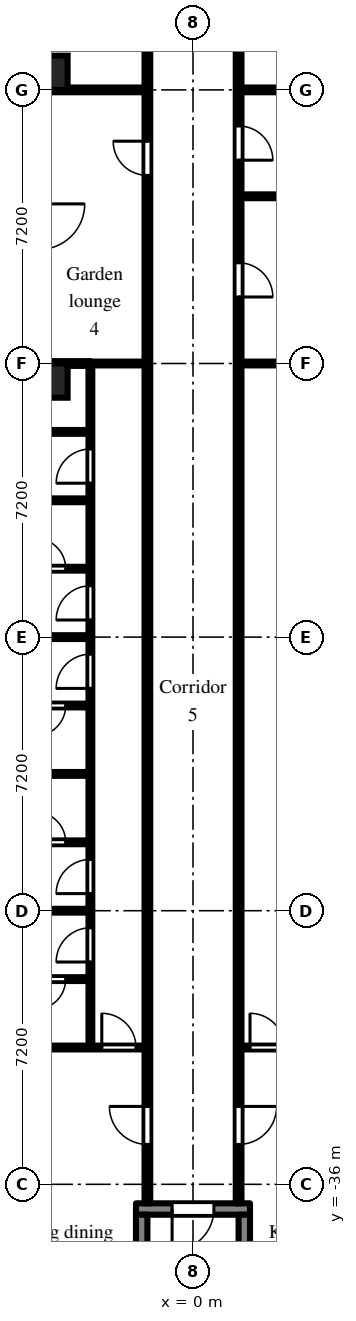
"""IFC4 building model, lengths in metres.
Left out: names, types, materials, properties, quantities, classifications, styles, units other than length and angle.
Written with IfcOpenShell. Run it as: python <this file> out.ifc"""

import sys

from ifc_helpers import new_model, si_unit, direction, frame, frame_2d, origin, origin_2d, place, context, subcontext, project, spatial, rectangle, extrude, element, fill, save


model = new_model("IFC4")
c1 = context("Model", 3, precision=1e-05, world=origin(), true_north=direction((0.0, 1.0)))
c2 = subcontext(c1, "Body", "Model", "MODEL_VIEW")
j1 = project(units=[si_unit("LENGTHUNIT", "METRE"), si_unit("PLANEANGLEUNIT", "RADIAN")], contexts=[c1])
p1 = place(None, origin())
s1 = spatial("IfcSite", under=j1, at=p1, CompositionType="ELEMENT")
p2 = place(p1, origin())
s2 = spatial("IfcBuilding", under=s1, at=p2, CompositionType="ELEMENT")
p3 = place(p2, frame((0.0, 0.0, 93.9)))
s3 = spatial("IfcBuildingStorey", under=s2, at=p3, CompositionType="ELEMENT", Elevation=93.9)
for number, where, z_axis, x_axis in (
    (1, (-3.75, -14.85, 0.0), (0.0, 0.0, 1.0), (1.0, 0.0, 0.0)),
    (2, (-3.75, -6.75, 0.0), (0.0, 0.0, 1.0), (1.0, 0.0, 0.0)),
):
    element("IfcColumn", number, at=place(p3, frame(where, z_axis=z_axis, x_axis=x_axis)), inside=s3, PredefinedType="COLUMN", context=c2, shape_type="SweptSolid", body=[
        extrude(rectangle(XDim=0.9, YDim=0.9, at=origin_2d()), origin(), (0.0, 0.0, 1.0), 3.0),
    ])
p4 = place(p3, frame((-1.5, -36.65, 0.0), z_axis=(0.0, 0.0, 1.0), x_axis=(1.0, 0.0, 0.0)))
e3 = element("IfcWall", 3, at=p4, inside=s3, PredefinedType="SHEAR", context=c2, shape_type="SweptSolid", body=[
    extrude(rectangle(XDim=3.0, YDim=0.3, at=frame_2d((1.5, 0.0))), origin(), (0.0, 0.0, 1.0), 2.575),
])
p5 = place(p4, frame((0.95, 0.0, 0.0)))
e4 = element("IfcOpeningElement", 4, at=p5, cuts=e3, PredefinedType="OPENING", context=c2, shape_type="SweptSolid", body=[
    extrude(rectangle(XDim=1.1, YDim=2.1, at=frame_2d((0.55, 1.05))), frame((0.0, 0.16, 0.0), z_axis=(0.0, -1.0, 0.0), x_axis=(1.0, 0.0, 0.0)), (0.0, 0.0, 1.0), 0.32),
])
for number, where, z_axis, x_axis in (
    (5, (-1.35, -36.8, 0.0), (0.0, 0.0, 1.0), (0.0, -1.0, 0.0)),
    (6, (1.35, -36.8, 0.0), (0.0, 0.0, 1.0), (0.0, -1.0, 0.0)),
):
    element("IfcWall", number, at=place(p3, frame(where, z_axis=z_axis, x_axis=x_axis)), inside=s3, PredefinedType="SHEAR", context=c2, shape_type="SweptSolid", body=[
        extrude(rectangle(XDim=5.8, YDim=0.3, at=frame_2d((2.9, 0.0))), origin(), (0.0, 0.0, 1.0), 2.575),
    ])
p6 = place(p3, frame((-6.9, -32.4, 0.0), z_axis=(0.0, 0.0, 1.0), x_axis=(1.0, 0.0, 0.0)))
e7 = element("IfcWall", 7, at=p6, inside=s3, PredefinedType="PARTITIONING", context=c2, shape_type="SweptSolid", body=[
    extrude(rectangle(XDim=5.625, YDim=0.1, at=frame_2d((2.812, 0.0))), origin(), (0.0, 0.0, 1.0), 2.575),
])
p7 = place(p6, frame((4.5, 0.0, 0.0)))
e8 = element("IfcOpeningElement", 8, at=p7, cuts=e7, PredefinedType="OPENING", context=c2, shape_type="SweptSolid", body=[
    extrude(rectangle(XDim=0.9, YDim=2.1, at=frame_2d((0.45, 1.05))), frame((0.0, 0.06, 0.0), z_axis=(0.0, -1.0, 0.0), x_axis=(1.0, 0.0, 0.0)), (0.0, 0.0, 1.0), 0.12),
])
for number, where, z_axis, x_axis in (
    (9, (-6.9, -28.8, 0.0), (0.0, 0.0, 1.0), (1.0, 0.0, 0.0)),
    (10, (-6.9, -25.2, 0.0), (0.0, 0.0, 1.0), (1.0, 0.0, 0.0)),
    (11, (-6.9, -21.6, 0.0), (0.0, 0.0, 1.0), (1.0, 0.0, 0.0)),
    (12, (-6.9, -18.0, 0.0), (0.0, 0.0, 1.0), (1.0, 0.0, 0.0)),
):
    element("IfcWall", number, at=place(p3, frame(where, z_axis=z_axis, x_axis=x_axis)), inside=s3, PredefinedType="PARTITIONING", context=c2, shape_type="SweptSolid", body=[
        extrude(rectangle(XDim=4.15, YDim=0.1, at=frame_2d((2.075, 0.0))), origin(), (0.0, 0.0, 1.0), 2.575),
    ])
p8 = place(p3, frame((-4.75, -30.6, 0.0), z_axis=(0.0, 0.0, 1.0), x_axis=(1.0, 0.0, 0.0)))
e13 = element("IfcWall", 13, at=p8, inside=s3, PredefinedType="PARTITIONING", context=c2, shape_type="SweptSolid", body=[
    extrude(rectangle(XDim=2.0, YDim=0.1, at=frame_2d((1.0, 0.0))), origin(), (0.0, 0.0, 1.0), 2.575),
])
p9 = place(p8, frame((0.6, 0.0, 0.0)))
e14 = element("IfcOpeningElement", 14, at=p9, cuts=e13, PredefinedType="OPENING", context=c2, shape_type="SweptSolid", body=[
    extrude(rectangle(XDim=0.8, YDim=2.1, at=frame_2d((0.4, 1.05))), frame((0.0, 0.06, 0.0), z_axis=(0.0, -1.0, 0.0), x_axis=(1.0, 0.0, 0.0)), (0.0, 0.0, 1.0), 0.12),
])
p10 = place(p3, frame((-4.75, -27.0, 0.0), z_axis=(0.0, 0.0, 1.0), x_axis=(1.0, 0.0, 0.0)))
e15 = element("IfcWall", 15, at=p10, inside=s3, PredefinedType="PARTITIONING", context=c2, shape_type="SweptSolid", body=[
    extrude(rectangle(XDim=2.0, YDim=0.1, at=frame_2d((1.0, 0.0))), origin(), (0.0, 0.0, 1.0), 2.575),
])
p11 = place(p10, frame((0.6, 0.0, 0.0)))
e16 = element("IfcOpeningElement", 16, at=p11, cuts=e15, PredefinedType="OPENING", context=c2, shape_type="SweptSolid", body=[
    extrude(rectangle(XDim=0.8, YDim=2.1, at=frame_2d((0.4, 1.05))), frame((0.0, 0.06, 0.0), z_axis=(0.0, -1.0, 0.0), x_axis=(1.0, 0.0, 0.0)), (0.0, 0.0, 1.0), 0.12),
])
p12 = place(p3, frame((-4.75, -23.4, 0.0), z_axis=(0.0, 0.0, 1.0), x_axis=(1.0, 0.0, 0.0)))
e17 = element("IfcWall", 17, at=p12, inside=s3, PredefinedType="PARTITIONING", context=c2, shape_type="SweptSolid", body=[
    extrude(rectangle(XDim=2.0, YDim=0.1, at=frame_2d((1.0, 0.0))), origin(), (0.0, 0.0, 1.0), 2.575),
])
p13 = place(p12, frame((0.6, 0.0, 0.0)))
e18 = element("IfcOpeningElement", 18, at=p13, cuts=e17, PredefinedType="OPENING", context=c2, shape_type="SweptSolid", body=[
    extrude(rectangle(XDim=0.8, YDim=2.1, at=frame_2d((0.4, 1.05))), frame((0.0, 0.06, 0.0), z_axis=(0.0, -1.0, 0.0), x_axis=(1.0, 0.0, 0.0)), (0.0, 0.0, 1.0), 0.12),
])
p14 = place(p3, frame((-4.75, -19.8, 0.0), z_axis=(0.0, 0.0, 1.0), x_axis=(1.0, 0.0, 0.0)))
e19 = element("IfcWall", 19, at=p14, inside=s3, PredefinedType="PARTITIONING", context=c2, shape_type="SweptSolid", body=[
    extrude(rectangle(XDim=2.0, YDim=0.1, at=frame_2d((1.0, 0.0))), origin(), (0.0, 0.0, 1.0), 2.575),
])
p15 = place(p14, frame((0.6, 0.0, 0.0)))
e20 = element("IfcOpeningElement", 20, at=p15, cuts=e19, PredefinedType="OPENING", context=c2, shape_type="SweptSolid", body=[
    extrude(rectangle(XDim=0.8, YDim=2.1, at=frame_2d((0.4, 1.05))), frame((0.0, 0.06, 0.0), z_axis=(0.0, -1.0, 0.0), x_axis=(1.0, 0.0, 0.0)), (0.0, 0.0, 1.0), 0.12),
])
p16 = place(p3, frame((-4.75, -16.2, 0.0), z_axis=(0.0, 0.0, 1.0), x_axis=(1.0, 0.0, 0.0)))
e21 = element("IfcWall", 21, at=p16, inside=s3, PredefinedType="PARTITIONING", context=c2, shape_type="SweptSolid", body=[
    extrude(rectangle(XDim=2.0, YDim=0.1, at=frame_2d((1.0, 0.0))), origin(), (0.0, 0.0, 1.0), 2.575),
])
p17 = place(p3, frame((-3.9, -14.4, 0.0), z_axis=(0.0, 0.0, 1.0), x_axis=(1.0, 0.0, 0.0)))
e22 = element("IfcWall", 22, at=p17, inside=s3, PredefinedType="PARTITIONING", context=c2, shape_type="SweptSolid", body=[
    extrude(rectangle(XDim=1.2, YDim=0.125, at=frame_2d((0.6, 0.0))), origin(), (0.0, 0.0, 1.0), 2.575),
])
p18 = place(p3, frame((-3.9, -7.2, 0.0), z_axis=(0.0, 0.0, 1.0), x_axis=(1.0, 0.0, 0.0)))
e23 = element("IfcWall", 23, at=p18, inside=s3, PredefinedType="PARTITIONING", context=c2, shape_type="SweptSolid", body=[
    extrude(rectangle(XDim=2.625, YDim=0.125, at=frame_2d((1.312, 0.0))), origin(), (0.0, 0.0, 1.0), 2.575),
])
p19 = place(p3, frame((-2.7, -32.35, 0.0), z_axis=(0.0, 0.0, 1.0), x_axis=(0.0, 1.0, 0.0)))
e24 = element("IfcWall", 24, at=p19, inside=s3, PredefinedType="PARTITIONING", context=c2, shape_type="SweptSolid", body=[
    extrude(rectangle(XDim=17.888, YDim=0.1, at=frame_2d((8.944, 0.0))), origin(), (0.0, 0.0, 1.0), 2.575),
])
p20 = place(p19, frame((2.2, 0.0, 0.0)))
e25 = element("IfcOpeningElement", 25, at=p20, cuts=e24, PredefinedType="OPENING", context=c2, shape_type="SweptSolid", body=[
    extrude(rectangle(XDim=0.9, YDim=2.1, at=frame_2d((0.45, 1.05))), frame((0.0, 0.06, 0.0), z_axis=(0.0, -1.0, 0.0), x_axis=(1.0, 0.0, 0.0)), (0.0, 0.0, 1.0), 0.12),
])
p21 = place(p19, frame((4.0, 0.0, 0.0)))
e26 = element("IfcOpeningElement", 26, at=p21, cuts=e24, PredefinedType="OPENING", context=c2, shape_type="SweptSolid", body=[
    extrude(rectangle(XDim=0.9, YDim=2.1, at=frame_2d((0.45, 1.05))), frame((0.0, 0.06, 0.0), z_axis=(0.0, -1.0, 0.0), x_axis=(1.0, 0.0, 0.0)), (0.0, 0.0, 1.0), 0.12),
])
p22 = place(p19, frame((9.4, 0.0, 0.0)))
e27 = element("IfcOpeningElement", 27, at=p22, cuts=e24, PredefinedType="OPENING", context=c2, shape_type="SweptSolid", body=[
    extrude(rectangle(XDim=0.9, YDim=2.1, at=frame_2d((0.45, 1.05))), frame((0.0, 0.06, 0.0), z_axis=(0.0, -1.0, 0.0), x_axis=(1.0, 0.0, 0.0)), (0.0, 0.0, 1.0), 0.12),
])
p23 = place(p19, frame((11.2, 0.0, 0.0)))
e28 = element("IfcOpeningElement", 28, at=p23, cuts=e24, PredefinedType="OPENING", context=c2, shape_type="SweptSolid", body=[
    extrude(rectangle(XDim=0.9, YDim=2.1, at=frame_2d((0.45, 1.05))), frame((0.0, 0.06, 0.0), z_axis=(0.0, -1.0, 0.0), x_axis=(1.0, 0.0, 0.0)), (0.0, 0.0, 1.0), 0.12),
])
p24 = place(p19, frame((14.8, 0.0, 0.0)))
e29 = element("IfcOpeningElement", 29, at=p24, cuts=e24, PredefinedType="OPENING", context=c2, shape_type="SweptSolid", body=[
    extrude(rectangle(XDim=0.9, YDim=2.1, at=frame_2d((0.45, 1.05))), frame((0.0, 0.06, 0.0), z_axis=(0.0, -1.0, 0.0), x_axis=(1.0, 0.0, 0.0)), (0.0, 0.0, 1.0), 0.12),
])
p25 = place(p3, frame((-2.7, -14.4, 0.0), z_axis=(0.0, 0.0, 1.0), x_axis=(1.0, 0.0, 0.0)))
e30 = element("IfcWall", 30, at=p25, inside=s3, PredefinedType="PARTITIONING", context=c2, shape_type="SweptSolid", body=[
    extrude(rectangle(XDim=1.425, YDim=0.1, at=frame_2d((0.712, 0.0))), origin(), (0.0, 0.0, 1.0), 2.575),
])
p26 = place(p3, frame((-1.2, -36.5, 0.0), z_axis=(0.0, 0.0, 1.0), x_axis=(0.0, 1.0, 0.0)))
e31 = element("IfcWall", 31, at=p26, inside=s3, PredefinedType="PARTITIONING", context=c2, shape_type="SweptSolid", body=[
    extrude(rectangle(XDim=35.225, YDim=0.15, at=frame_2d((17.613, 0.0))), origin(), (0.0, 0.0, 1.0), 2.575),
])
p27 = place(p26, frame((31.85, 0.0, 0.0)))
e32 = element("IfcOpeningElement", 32, at=p27, cuts=e31, PredefinedType="OPENING", context=c2, shape_type="SweptSolid", body=[
    extrude(rectangle(XDim=0.9, YDim=2.1, at=frame_2d((0.45, 1.05))), frame((0.0, 0.085, 0.0), z_axis=(0.0, -1.0, 0.0), x_axis=(1.0, 0.0, 0.0)), (0.0, 0.0, 1.0), 0.17),
])
p28 = place(p26, frame((27.05, 0.0, 0.0)))
e33 = element("IfcOpeningElement", 33, at=p28, cuts=e31, PredefinedType="OPENING", context=c2, shape_type="SweptSolid", body=[
    extrude(rectangle(XDim=0.9, YDim=2.1, at=frame_2d((0.45, 1.05))), frame((0.0, 0.085, 0.0), z_axis=(0.0, -1.0, 0.0), x_axis=(1.0, 0.0, 0.0)), (0.0, 0.0, 1.0), 0.17),
])
p29 = place(p26, frame((1.55, 0.0, 0.0)))
e34 = element("IfcOpeningElement", 34, at=p29, cuts=e31, PredefinedType="OPENING", context=c2, shape_type="SweptSolid", body=[
    extrude(rectangle(XDim=1.0, YDim=2.1, at=frame_2d((0.5, 1.05))), frame((0.0, 0.085, 0.0), z_axis=(0.0, -1.0, 0.0), x_axis=(1.0, 0.0, 0.0)), (0.0, 0.0, 1.0), 0.17),
])
p30 = place(p3, frame((1.2, -36.5, 0.0), z_axis=(0.0, 0.0, 1.0), x_axis=(0.0, 1.0, 0.0)))
e35 = element("IfcWall", 35, at=p30, inside=s3, PredefinedType="PARTITIONING", context=c2, shape_type="SweptSolid", body=[
    extrude(rectangle(XDim=35.375, YDim=0.15, at=frame_2d((17.688, 0.0))), origin(), (0.0, 0.0, 1.0), 2.575),
])
p31 = place(p30, frame((33.65, 0.0, 0.0)))
e36 = element("IfcOpeningElement", 36, at=p31, cuts=e35, PredefinedType="OPENING", context=c2, shape_type="SweptSolid", body=[
    extrude(rectangle(XDim=0.9, YDim=2.1, at=frame_2d((0.45, 1.05))), frame((0.0, 0.085, 0.0), z_axis=(0.0, -1.0, 0.0), x_axis=(1.0, 0.0, 0.0)), (0.0, 0.0, 1.0), 0.17),
])
p32 = place(p30, frame((30.65, 0.0, 0.0)))
e37 = element("IfcOpeningElement", 37, at=p32, cuts=e35, PredefinedType="OPENING", context=c2, shape_type="SweptSolid", body=[
    extrude(rectangle(XDim=0.9, YDim=2.1, at=frame_2d((0.45, 1.05))), frame((0.0, 0.085, 0.0), z_axis=(0.0, -1.0, 0.0), x_axis=(1.0, 0.0, 0.0)), (0.0, 0.0, 1.0), 0.17),
])
p33 = place(p30, frame((27.45, 0.0, 0.0)))
e38 = element("IfcOpeningElement", 38, at=p33, cuts=e35, PredefinedType="OPENING", context=c2, shape_type="SweptSolid", body=[
    extrude(rectangle(XDim=0.9, YDim=2.1, at=frame_2d((0.45, 1.05))), frame((0.0, 0.085, 0.0), z_axis=(0.0, -1.0, 0.0), x_axis=(1.0, 0.0, 0.0)), (0.0, 0.0, 1.0), 0.17),
])
p34 = place(p30, frame((23.85, 0.0, 0.0)))
e39 = element("IfcOpeningElement", 39, at=p34, cuts=e35, PredefinedType="OPENING", context=c2, shape_type="SweptSolid", body=[
    extrude(rectangle(XDim=0.9, YDim=2.1, at=frame_2d((0.45, 1.05))), frame((0.0, 0.085, 0.0), z_axis=(0.0, -1.0, 0.0), x_axis=(1.0, 0.0, 0.0)), (0.0, 0.0, 1.0), 0.17),
])
p35 = place(p30, frame((1.55, 0.0, 0.0)))
e40 = element("IfcOpeningElement", 40, at=p35, cuts=e35, PredefinedType="OPENING", context=c2, shape_type="SweptSolid", body=[
    extrude(rectangle(XDim=1.0, YDim=2.1, at=frame_2d((0.5, 1.05))), frame((0.0, 0.085, 0.0), z_axis=(0.0, -1.0, 0.0), x_axis=(1.0, 0.0, 0.0)), (0.0, 0.0, 1.0), 0.17),
])
p36 = place(p3, frame((1.275, -32.4, 0.0), z_axis=(0.0, 0.0, 1.0), x_axis=(1.0, 0.0, 0.0)))
e41 = element("IfcWall", 41, at=p36, inside=s3, PredefinedType="PARTITIONING", context=c2, shape_type="SweptSolid", body=[
    extrude(rectangle(XDim=5.625, YDim=0.1, at=frame_2d((2.812, 0.0))), origin(), (0.0, 0.0, 1.0), 2.575),
])
p37 = place(p36, frame((0.225, 0.0, 0.0)))
e42 = element("IfcOpeningElement", 42, at=p37, cuts=e41, PredefinedType="OPENING", context=c2, shape_type="SweptSolid", body=[
    extrude(rectangle(XDim=0.9, YDim=2.1, at=frame_2d((0.45, 1.05))), frame((0.0, 0.06, 0.0), z_axis=(0.0, -1.0, 0.0), x_axis=(1.0, 0.0, 0.0)), (0.0, 0.0, 1.0), 0.12),
])
p38 = place(p3, frame((1.275, -14.4, 0.0), z_axis=(0.0, 0.0, 1.0), x_axis=(1.0, 0.0, 0.0)))
e43 = element("IfcWall", 43, at=p38, inside=s3, PredefinedType="PARTITIONING", context=c2, shape_type="SweptSolid", body=[
    extrude(rectangle(XDim=1.425, YDim=0.1, at=frame_2d((0.712, 0.0))), origin(), (0.0, 0.0, 1.0), 2.575),
])
p39 = place(p3, frame((1.275, -10.0, 0.0), z_axis=(0.0, 0.0, 1.0), x_axis=(1.0, 0.0, 0.0)))
e44 = element("IfcWall", 44, at=p39, inside=s3, PredefinedType="PARTITIONING", context=c2, shape_type="SweptSolid", body=[
    extrude(rectangle(XDim=2.625, YDim=0.1, at=frame_2d((1.312, 0.0))), origin(), (0.0, 0.0, 1.0), 2.575),
])
p40 = place(p3, frame((1.275, -7.2, 0.0), z_axis=(0.0, 0.0, 1.0), x_axis=(1.0, 0.0, 0.0)))
e45 = element("IfcWall", 45, at=p40, inside=s3, PredefinedType="PARTITIONING", context=c2, shape_type="SweptSolid", body=[
    extrude(rectangle(XDim=2.625, YDim=0.125, at=frame_2d((1.312, 0.0))), origin(), (0.0, 0.0, 1.0), 2.575),
])
p41 = place(p5, frame((1.1, 0.0, 0.0), z_axis=(0.0, 0.0, 1.0), x_axis=(-1.0, 0.0, 0.0)))
e46 = element("IfcDoor", 46, at=p41, inside=s3, OperationType="SINGLE_SWING_RIGHT", PredefinedType="DOOR", context=c2, shape_type="SweptSolid", body=[
    extrude(rectangle(XDim=1.1, YDim=2.1, at=frame_2d((0.55, 1.05))), frame((0.0, 0.025, 0.0), z_axis=(0.0, -1.0, 0.0), x_axis=(1.0, 0.0, 0.0)), (0.0, 0.0, 1.0), 0.05),
])
fill(e4, e46)
p42 = place(p33, frame((0.9, 0.0, 0.0), z_axis=(0.0, 0.0, 1.0), x_axis=(-1.0, 0.0, 0.0)))
e47 = element("IfcDoor", 47, at=p42, inside=s3, OperationType="SINGLE_SWING_RIGHT", PredefinedType="DOOR", context=c2, shape_type="SweptSolid", body=[
    extrude(rectangle(XDim=0.9, YDim=2.1, at=frame_2d((0.45, 1.05))), frame((0.0, 0.025, 0.0), z_axis=(0.0, -1.0, 0.0), x_axis=(1.0, 0.0, 0.0)), (0.0, 0.0, 1.0), 0.05),
])
fill(e38, e47)
p43 = place(p34, frame((0.9, 0.0, 0.0), z_axis=(0.0, 0.0, 1.0), x_axis=(-1.0, 0.0, 0.0)))
e48 = element("IfcDoor", 48, at=p43, inside=s3, OperationType="SINGLE_SWING_RIGHT", PredefinedType="DOOR", context=c2, shape_type="SweptSolid", body=[
    extrude(rectangle(XDim=0.9, YDim=2.1, at=frame_2d((0.45, 1.05))), frame((0.0, 0.025, 0.0), z_axis=(0.0, -1.0, 0.0), x_axis=(1.0, 0.0, 0.0)), (0.0, 0.0, 1.0), 0.05),
])
fill(e39, e48)
p44 = place(p35, frame((1.0, 0.0, 0.0), z_axis=(0.0, 0.0, 1.0), x_axis=(-1.0, 0.0, 0.0)))
e49 = element("IfcDoor", 49, at=p44, inside=s3, OperationType="SINGLE_SWING_LEFT", PredefinedType="DOOR", context=c2, shape_type="SweptSolid", body=[
    extrude(rectangle(XDim=1.0, YDim=2.1, at=frame_2d((0.5, 1.05))), frame((0.0, 0.025, 0.0), z_axis=(0.0, -1.0, 0.0), x_axis=(1.0, 0.0, 0.0)), (0.0, 0.0, 1.0), 0.05),
])
fill(e40, e49)
p45 = place(p37, origin())
e50 = element("IfcDoor", 50, at=p45, inside=s3, OperationType="SINGLE_SWING_LEFT", PredefinedType="DOOR", context=c2, shape_type="SweptSolid", body=[
    extrude(rectangle(XDim=0.9, YDim=2.1, at=frame_2d((0.45, 1.05))), frame((0.0, 0.025, 0.0), z_axis=(0.0, -1.0, 0.0), x_axis=(1.0, 0.0, 0.0)), (0.0, 0.0, 1.0), 0.05),
])
fill(e42, e50)
p46 = place(p28, origin())
e51 = element("IfcDoor", 51, at=p46, inside=s3, OperationType="SINGLE_SWING_RIGHT", PredefinedType="DOOR", context=c2, shape_type="SweptSolid", body=[
    extrude(rectangle(XDim=0.9, YDim=2.1, at=frame_2d((0.45, 1.05))), frame((0.0, 0.025, 0.0), z_axis=(0.0, -1.0, 0.0), x_axis=(1.0, 0.0, 0.0)), (0.0, 0.0, 1.0), 0.05),
])
fill(e33, e51)
p47 = place(p29, origin())
e52 = element("IfcDoor", 52, at=p47, inside=s3, OperationType="SINGLE_SWING_RIGHT", PredefinedType="DOOR", context=c2, shape_type="SweptSolid", body=[
    extrude(rectangle(XDim=1.0, YDim=2.1, at=frame_2d((0.5, 1.05))), frame((0.0, 0.025, 0.0), z_axis=(0.0, -1.0, 0.0), x_axis=(1.0, 0.0, 0.0)), (0.0, 0.0, 1.0), 0.05),
])
fill(e34, e52)
p48 = place(p20, origin())
e53 = element("IfcDoor", 53, at=p48, inside=s3, OperationType="SINGLE_SWING_LEFT", PredefinedType="DOOR", context=c2, shape_type="SweptSolid", body=[
    extrude(rectangle(XDim=0.9, YDim=2.1, at=frame_2d((0.45, 1.05))), frame((0.0, 0.025, 0.0), z_axis=(0.0, -1.0, 0.0), x_axis=(1.0, 0.0, 0.0)), (0.0, 0.0, 1.0), 0.05),
])
fill(e25, e53)
p49 = place(p21, origin())
e54 = element("IfcDoor", 54, at=p49, inside=s3, OperationType="SINGLE_SWING_LEFT", PredefinedType="DOOR", context=c2, shape_type="SweptSolid", body=[
    extrude(rectangle(XDim=0.9, YDim=2.1, at=frame_2d((0.45, 1.05))), frame((0.0, 0.025, 0.0), z_axis=(0.0, -1.0, 0.0), x_axis=(1.0, 0.0, 0.0)), (0.0, 0.0, 1.0), 0.05),
])
fill(e26, e54)
p50 = place(p22, origin())
e55 = element("IfcDoor", 55, at=p50, inside=s3, OperationType="SINGLE_SWING_LEFT", PredefinedType="DOOR", context=c2, shape_type="SweptSolid", body=[
    extrude(rectangle(XDim=0.9, YDim=2.1, at=frame_2d((0.45, 1.05))), frame((0.0, 0.025, 0.0), z_axis=(0.0, -1.0, 0.0), x_axis=(1.0, 0.0, 0.0)), (0.0, 0.0, 1.0), 0.05),
])
fill(e27, e55)
p51 = place(p23, origin())
e56 = element("IfcDoor", 56, at=p51, inside=s3, OperationType="SINGLE_SWING_LEFT", PredefinedType="DOOR", context=c2, shape_type="SweptSolid", body=[
    extrude(rectangle(XDim=0.9, YDim=2.1, at=frame_2d((0.45, 1.05))), frame((0.0, 0.025, 0.0), z_axis=(0.0, -1.0, 0.0), x_axis=(1.0, 0.0, 0.0)), (0.0, 0.0, 1.0), 0.05),
])
fill(e28, e56)
p52 = place(p24, origin())
e57 = element("IfcDoor", 57, at=p52, inside=s3, OperationType="SINGLE_SWING_LEFT", PredefinedType="DOOR", context=c2, shape_type="SweptSolid", body=[
    extrude(rectangle(XDim=0.9, YDim=2.1, at=frame_2d((0.45, 1.05))), frame((0.0, 0.025, 0.0), z_axis=(0.0, -1.0, 0.0), x_axis=(1.0, 0.0, 0.0)), (0.0, 0.0, 1.0), 0.05),
])
fill(e29, e57)
p53 = place(p7, origin())
e58 = element("IfcDoor", 58, at=p53, inside=s3, OperationType="SINGLE_SWING_LEFT", PredefinedType="DOOR", context=c2, shape_type="SweptSolid", body=[
    extrude(rectangle(XDim=0.9, YDim=2.1, at=frame_2d((0.45, 1.05))), frame((0.0, 0.025, 0.0), z_axis=(0.0, -1.0, 0.0), x_axis=(1.0, 0.0, 0.0)), (0.0, 0.0, 1.0), 0.05),
])
fill(e8, e58)
p54 = place(p15, origin())
e59 = element("IfcDoor", 59, at=p54, inside=s3, OperationType="SINGLE_SWING_LEFT", PredefinedType="DOOR", context=c2, shape_type="SweptSolid", body=[
    extrude(rectangle(XDim=0.8, YDim=2.1, at=frame_2d((0.4, 1.05))), frame((0.0, 0.025, 0.0), z_axis=(0.0, -1.0, 0.0), x_axis=(1.0, 0.0, 0.0)), (0.0, 0.0, 1.0), 0.05),
])
fill(e20, e59)
p55 = place(p13, frame((0.8, 0.0, 0.0), z_axis=(0.0, 0.0, 1.0), x_axis=(-1.0, 0.0, 0.0)))
e60 = element("IfcDoor", 60, at=p55, inside=s3, OperationType="SINGLE_SWING_RIGHT", PredefinedType="DOOR", context=c2, shape_type="SweptSolid", body=[
    extrude(rectangle(XDim=0.8, YDim=2.1, at=frame_2d((0.4, 1.05))), frame((0.0, 0.025, 0.0), z_axis=(0.0, -1.0, 0.0), x_axis=(1.0, 0.0, 0.0)), (0.0, 0.0, 1.0), 0.05),
])
fill(e18, e60)
p56 = place(p11, origin())
e61 = element("IfcDoor", 61, at=p56, inside=s3, OperationType="SINGLE_SWING_LEFT", PredefinedType="DOOR", context=c2, shape_type="SweptSolid", body=[
    extrude(rectangle(XDim=0.8, YDim=2.1, at=frame_2d((0.4, 1.05))), frame((0.0, 0.025, 0.0), z_axis=(0.0, -1.0, 0.0), x_axis=(1.0, 0.0, 0.0)), (0.0, 0.0, 1.0), 0.05),
])
fill(e16, e61)
p57 = place(p9, frame((0.8, 0.0, 0.0), z_axis=(0.0, 0.0, 1.0), x_axis=(-1.0, 0.0, 0.0)))
e62 = element("IfcDoor", 62, at=p57, inside=s3, OperationType="SINGLE_SWING_RIGHT", PredefinedType="DOOR", context=c2, shape_type="SweptSolid", body=[
    extrude(rectangle(XDim=0.8, YDim=2.1, at=frame_2d((0.4, 1.05))), frame((0.0, 0.025, 0.0), z_axis=(0.0, -1.0, 0.0), x_axis=(1.0, 0.0, 0.0)), (0.0, 0.0, 1.0), 0.05),
])
fill(e14, e62)
save(model, sys.argv[1])
